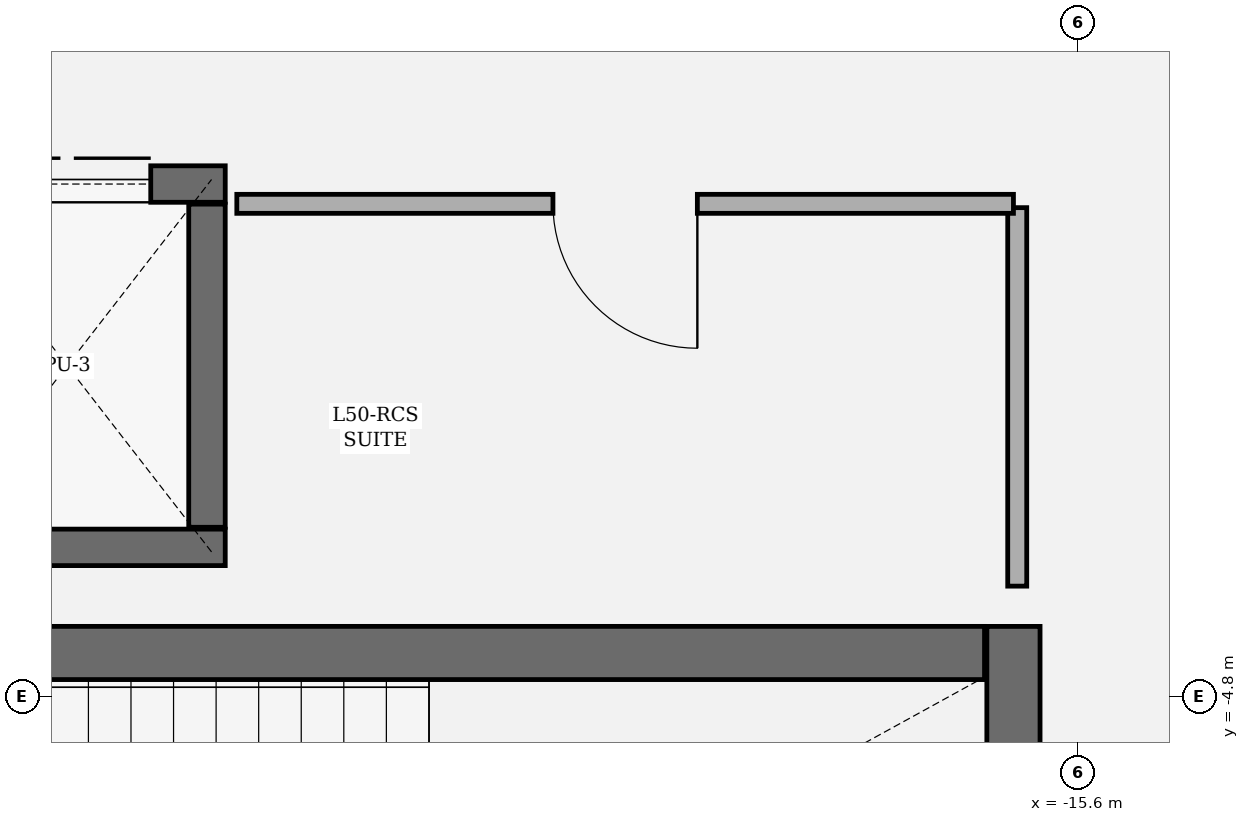
"""IFC4 building model, lengths in metres.
Left out: names, types, materials, properties, quantities, classifications, styles, units other than length and angle.
Written with IfcOpenShell. Run it as: python <this file> out.ifc"""

import sys

from ifc_helpers import new_model, si_unit, direction, frame, frame_2d, origin, place, context, subcontext, project, spatial, rectangle, extrude, element, fill, save


model = new_model("IFC4")
c1 = context("Model", 3, precision=1e-05, world=origin(), true_north=direction((0.0, 1.0)))
c2 = subcontext(c1, "Body", "Model", "MODEL_VIEW")
j1 = project(units=[si_unit("LENGTHUNIT", "METRE"), si_unit("PLANEANGLEUNIT", "RADIAN")], contexts=[c1])
p1 = place(None, origin())
s1 = spatial("IfcSite", under=j1, at=p1, CompositionType="ELEMENT")
p2 = place(p1, origin())
s2 = spatial("IfcBuilding", under=s1, at=p2, CompositionType="ELEMENT")
p3 = place(p2, frame((0.0, 0.0, 217.2)))
s3 = spatial("IfcBuildingStorey", under=s2, at=p3, CompositionType="ELEMENT", Elevation=217.2)
p4 = place(p3, frame((-16.025, -8.55, 0.0), z_axis=(0.0, 0.0, 1.0), x_axis=(0.0, 1.0, 0.0)))
e1 = element("IfcWall", 1, at=p4, inside=s3, PredefinedType="SHEAR", context=c2, shape_type="SweptSolid", body=[
    extrude(rectangle(XDim=4.21, YDim=0.35, at=frame_2d((2.105, 0.0))), origin(), (0.0, 0.0, 1.0), 3.78),
])
p5 = place(p3, frame((-16.215, -4.515, 0.0), z_axis=(0.0, 0.0, 1.0), x_axis=(-1.0, 0.0, 0.0)))
e2 = element("IfcWall", 2, at=p5, inside=s3, PredefinedType="SHEAR", context=c2, shape_type="SweptSolid", body=[
    extrude(rectangle(XDim=8.12, YDim=0.35, at=frame_2d((4.06, 0.0))), origin(), (0.0, 0.0, 1.0), 3.78),
])
p6 = place(p3, frame((-21.21, -3.82, 0.0), z_axis=(0.0, 0.0, 1.0), x_axis=(-1.0, 0.0, 0.0)))
e3 = element("IfcWall", 3, at=p6, inside=s3, PredefinedType="SHEAR", context=c2, shape_type="SweptSolid", body=[
    extrude(rectangle(XDim=1.8, YDim=0.24, at=frame_2d((0.9, 0.0))), origin(), (0.0, 0.0, 1.0), 3.78),
])
p7 = place(p3, frame((-23.01, -1.43, 0.0), z_axis=(0.0, 0.0, 1.0), x_axis=(1.0, 0.0, 0.0)))
e4 = element("IfcWall", 4, at=p7, inside=s3, PredefinedType="SHEAR", context=c2, shape_type="SweptSolid", body=[
    extrude(rectangle(XDim=1.8, YDim=0.24, at=frame_2d((0.9, 0.0))), origin(), (0.0, 0.0, 1.0), 3.78),
])
p8 = place(p7, frame((0.21, 0.0, 0.0)))
e5 = element("IfcOpeningElement", 5, at=p8, cuts=e4, PredefinedType="OPENING", context=c2, shape_type="SweptSolid", body=[
    extrude(rectangle(XDim=1.1, YDim=2.2, at=frame_2d((0.55, 1.1))), frame((0.0, 0.13, 0.0), z_axis=(0.0, -1.0, 0.0), x_axis=(1.0, 0.0, 0.0)), (0.0, 0.0, 1.0), 0.26),
])
p9 = place(p3, frame((-21.33, -1.562, 0.0), z_axis=(0.0, 0.0, 1.0), x_axis=(0.0, -1.0, 0.0)))
e6 = element("IfcWall", 6, at=p9, inside=s3, PredefinedType="SHEAR", context=c2, shape_type="SweptSolid", body=[
    extrude(rectangle(XDim=2.126, YDim=0.24, at=frame_2d((1.063, 0.0))), origin(), (0.0, 0.0, 1.0), 3.78),
])
p10 = place(p3, frame((-16.0, -4.075, 0.0), z_axis=(0.0, 0.0, 1.0), x_axis=(0.0, 1.0, 0.0)))
e7 = element("IfcWall", 7, at=p10, inside=s3, PredefinedType="PARTITIONING", context=c2, shape_type="SweptSolid", body=[
    extrude(rectangle(XDim=2.49, YDim=0.125, at=frame_2d((1.245, 0.0))), origin(), (0.0, 0.0, 1.0), 3.78),
])
p11 = place(p3, frame((-16.025, -1.56, 0.0), z_axis=(0.0, 0.0, 1.0), x_axis=(-1.0, 0.0, 0.0)))
e8 = element("IfcWall", 8, at=p11, inside=s3, PredefinedType="PARTITIONING", context=c2, shape_type="SweptSolid", body=[
    extrude(rectangle(XDim=5.109, YDim=0.125, at=frame_2d((2.554, 0.0))), origin(), (0.0, 0.0, 1.0), 3.78),
])
p12 = place(p11, frame((2.079, 0.0, 0.0)))
e9 = element("IfcOpeningElement", 9, at=p12, cuts=e8, PredefinedType="OPENING", context=c2, shape_type="SweptSolid", body=[
    extrude(rectangle(XDim=0.95, YDim=2.15, at=frame_2d((0.475, 1.075))), frame((0.0, 0.073, 0.0), z_axis=(0.0, -1.0, 0.0), x_axis=(1.0, 0.0, 0.0)), (0.0, 0.0, 1.0), 0.145),
])
p13 = place(p8, origin())
e10 = element("IfcDoor", 10, at=p13, inside=s3, OperationType="DOUBLE_DOOR_SLIDING", PredefinedType="DOOR", context=c2, shape_type="SweptSolid", body=[
    extrude(rectangle(XDim=1.1, YDim=2.2, at=frame_2d((0.55, 1.1))), frame((0.0, 0.025, 0.0), z_axis=(0.0, -1.0, 0.0), x_axis=(1.0, 0.0, 0.0)), (0.0, 0.0, 1.0), 0.05),
])
fill(e5, e10)
p14 = place(p12, origin())
e11 = element("IfcDoor", 11, at=p14, inside=s3, OperationType="SINGLE_SWING_LEFT", PredefinedType="DOOR", context=c2, shape_type="SweptSolid", body=[
    extrude(rectangle(XDim=0.95, YDim=2.15, at=frame_2d((0.475, 1.075))), frame((0.0, 0.025, 0.0), z_axis=(0.0, -1.0, 0.0), x_axis=(1.0, 0.0, 0.0)), (0.0, 0.0, 1.0), 0.05),
])
fill(e9, e11)
save(model, sys.argv[1])
